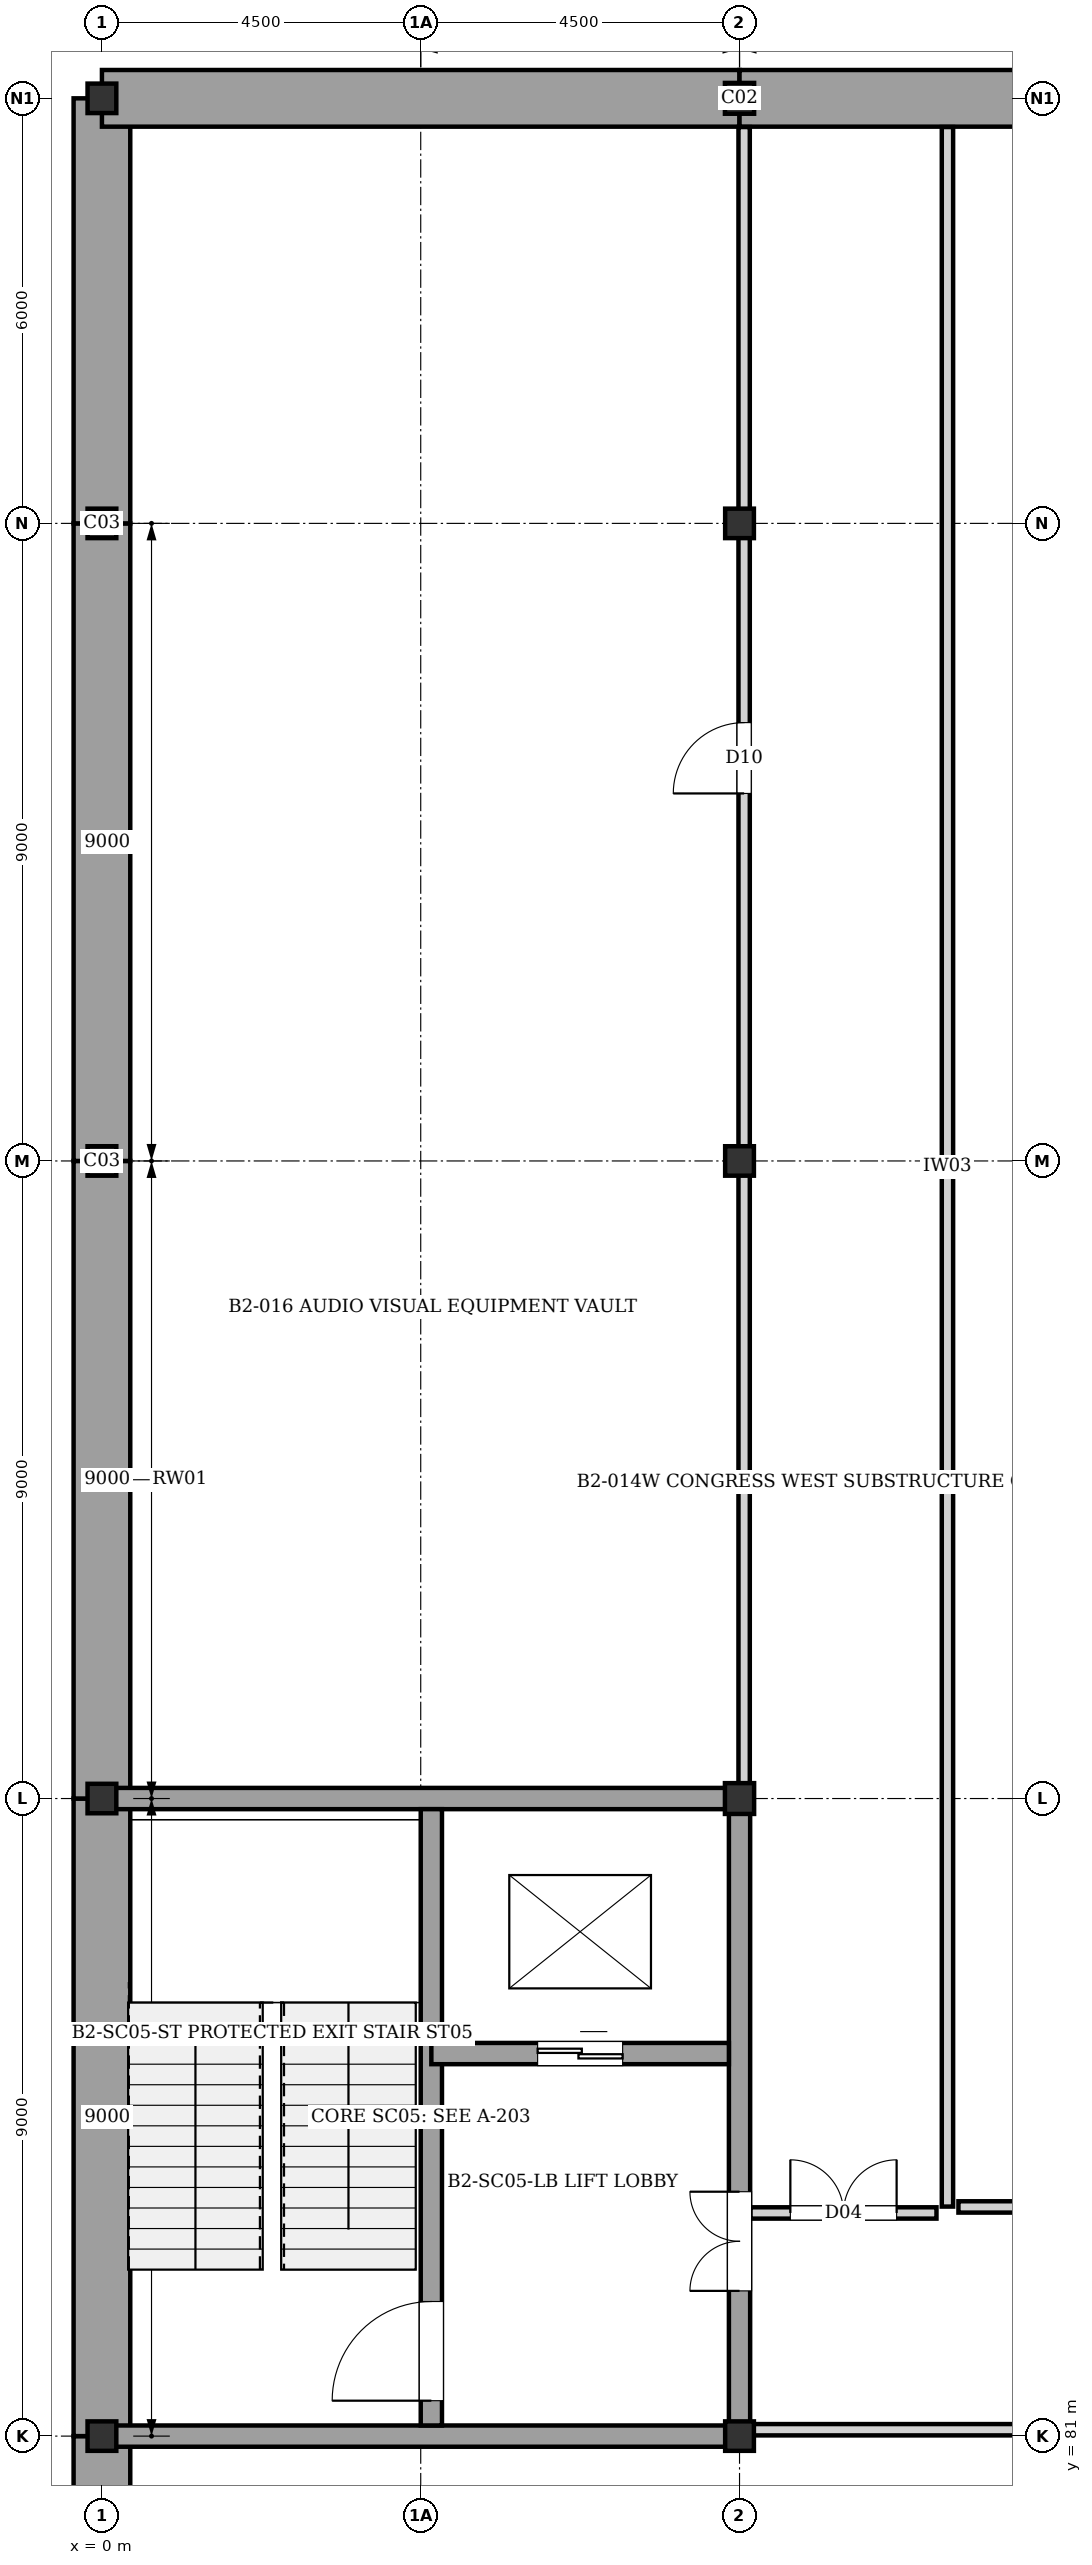
"""IFC4 building model, lengths in metres.
Left out: names, types, materials, properties, quantities, classifications, styles, units other than length and angle.
Written with IfcOpenShell. Run it as: python <this file> out.ifc"""

import sys

from ifc_helpers import new_model, si_unit, direction, frame, frame_2d, origin, origin_2d, place, context, subcontext, project, spatial, rectangle, i_section, extrude, element, fill, save


model = new_model("IFC4")
c1 = context("Model", 3, precision=1e-05, world=origin(), true_north=direction((0.0, 1.0)))
c2 = subcontext(c1, "Body", "Model", "MODEL_VIEW")
j1 = project(units=[si_unit("LENGTHUNIT", "METRE"), si_unit("PLANEANGLEUNIT", "RADIAN")], contexts=[c1])
p1 = place(None, origin())
s1 = spatial("IfcSite", under=j1, at=p1, CompositionType="ELEMENT")
p2 = place(p1, origin())
s2 = spatial("IfcBuilding", under=s1, at=p2, CompositionType="ELEMENT")
p3 = place(p2, frame((0.0, 0.0, -8.96)))
s3 = spatial("IfcBuildingStorey", under=s2, at=p3, CompositionType="ELEMENT", Elevation=-8.96)
for number, where, z_axis, x_axis in (
    (1, (0.0, 81.0, 0.0), (0.0, 0.0, 1.0), (1.0, 0.0, 0.0)),
    (2, (0.0, 90.0, 0.0), (0.0, 0.0, 1.0), (1.0, 0.0, 0.0)),
    (3, (0.0, 99.0, 0.0), (0.0, 0.0, 1.0), (1.0, 0.0, 0.0)),
    (4, (0.0, 108.0, 0.0), (0.0, 0.0, 1.0), (1.0, 0.0, 0.0)),
    (5, (0.0, 114.0, 0.0), (0.0, 0.0, 1.0), (1.0, 0.0, 0.0)),
    (6, (9.0, 81.0, 0.0), (0.0, 0.0, 1.0), (1.0, 0.0, 0.0)),
):
    element("IfcColumn", number, at=place(p3, frame(where, z_axis=z_axis, x_axis=x_axis)), inside=s3, PredefinedType="COLUMN", context=c2, shape_type="SweptSolid", body=[
        extrude(i_section(OverallWidth=0.406, OverallDepth=0.416, WebThickness=0.022, FlangeThickness=0.038, at=origin_2d()), origin(), (0.0, 0.0, 1.0), 4.48),
    ])
p4 = place(p3, frame((9.0, 90.0, 0.0), z_axis=(0.0, 0.0, 1.0), x_axis=(1.0, 0.0, 0.0)))
e7 = element("IfcColumn", 7, at=p4, inside=s3, PredefinedType="COLUMN", context=c2, shape_type="SweptSolid", body=[
    extrude(i_section(OverallWidth=0.412, OverallDepth=0.435, WebThickness=0.027, FlangeThickness=0.046, at=origin_2d()), origin(), (0.0, 0.0, 1.0), 4.48),
])
for number, where, z_axis, x_axis in (
    (8, (9.0, 99.0, 0.0), (0.0, 0.0, 1.0), (1.0, 0.0, 0.0)),
    (9, (9.0, 108.0, 0.0), (0.0, 0.0, 1.0), (1.0, 0.0, 0.0)),
):
    element("IfcColumn", number, at=place(p3, frame(where, z_axis=z_axis, x_axis=x_axis)), inside=s3, PredefinedType="COLUMN", context=c2, shape_type="SweptSolid", body=[
        extrude(i_section(OverallWidth=0.406, OverallDepth=0.416, WebThickness=0.022, FlangeThickness=0.038, at=origin_2d()), origin(), (0.0, 0.0, 1.0), 4.48),
    ])
p5 = place(p3, frame((9.0, 114.0, 0.0), z_axis=(0.0, 0.0, 1.0), x_axis=(1.0, 0.0, 0.0)))
e10 = element("IfcColumn", 10, at=p5, inside=s3, PredefinedType="COLUMN", context=c2, shape_type="SweptSolid", body=[
    extrude(i_section(OverallWidth=0.412, OverallDepth=0.435, WebThickness=0.027, FlangeThickness=0.046, at=origin_2d()), origin(), (0.0, 0.0, 1.0), 4.48),
])
p6 = place(p3, frame((0.0, 72.0, 0.0), z_axis=(0.0, 0.0, 1.0), x_axis=(0.0, 1.0, 0.0)))
e11 = element("IfcWall", 11, at=p6, inside=s3, PredefinedType="USERDEFINED", context=c2, shape_type="SweptSolid", body=[
    extrude(rectangle(XDim=9.0, YDim=0.8, at=frame_2d((4.5, 0.0))), origin(), (0.0, 0.0, 1.0), 4.03),
])
for number, where, z_axis, x_axis in (
    (12, (0.0, 81.0, 0.0), (0.0, 0.0, 1.0), (0.0, 1.0, 0.0)),
    (13, (0.0, 90.0, 0.0), (0.0, 0.0, 1.0), (0.0, 1.0, 0.0)),
    (14, (0.0, 99.0, 0.0), (0.0, 0.0, 1.0), (0.0, 1.0, 0.0)),
):
    element("IfcWall", number, at=place(p3, frame(where, z_axis=z_axis, x_axis=x_axis)), inside=s3, PredefinedType="USERDEFINED", context=c2, shape_type="SweptSolid", body=[
        extrude(rectangle(XDim=9.0, YDim=0.8, at=frame_2d((4.5, 0.0))), origin(), (0.0, 0.0, 1.0), 4.2),
    ])
p7 = place(p3, frame((0.0, 108.0, 0.0), z_axis=(0.0, 0.0, 1.0), x_axis=(0.0, 1.0, 0.0)))
e15 = element("IfcWall", 15, at=p7, inside=s3, PredefinedType="USERDEFINED", context=c2, shape_type="SweptSolid", body=[
    extrude(rectangle(XDim=6.0, YDim=0.8, at=frame_2d((3.0, 0.0))), origin(), (0.0, 0.0, 1.0), 4.2),
])
for number, where, z_axis, x_axis in (
    (16, (0.0, 114.0, 0.0), (0.0, 0.0, 1.0), (1.0, 0.0, 0.0)),
    (17, (9.0, 114.0, 0.0), (0.0, 0.0, 1.0), (1.0, 0.0, 0.0)),
):
    element("IfcWall", number, at=place(p3, frame(where, z_axis=z_axis, x_axis=x_axis)), inside=s3, PredefinedType="USERDEFINED", context=c2, shape_type="SweptSolid", body=[
        extrude(rectangle(XDim=9.0, YDim=0.8, at=frame_2d((4.5, 0.0))), origin(), (0.0, 0.0, 1.0), 4.2),
    ])
p8 = place(p3, frame((0.0, 81.0, 0.0), z_axis=(0.0, 0.0, 1.0), x_axis=(1.0, 0.0, 0.0)))
e18 = element("IfcWall", 18, at=p8, inside=s3, PredefinedType="SHEAR", context=c2, shape_type="SweptSolid", body=[
    extrude(rectangle(XDim=9.0, YDim=0.3, at=frame_2d((4.5, 0.0))), origin(), (0.0, 0.0, 1.0), 4.2),
])
p9 = place(p3, frame((9.0, 81.0, 0.0), z_axis=(0.0, 0.0, 1.0), x_axis=(0.0, 1.0, 0.0)))
e19 = element("IfcWall", 19, at=p9, inside=s3, PredefinedType="SHEAR", context=c2, shape_type="SweptSolid", body=[
    extrude(rectangle(XDim=9.0, YDim=0.3, at=frame_2d((4.5, 0.0))), origin(), (0.0, 0.0, 1.0), 4.2),
])
p10 = place(p9, frame((2.05, 0.0, 0.0)))
e20 = element("IfcOpeningElement", 20, at=p10, cuts=e19, PredefinedType="OPENING", context=c2, shape_type="SweptSolid", body=[
    extrude(rectangle(XDim=1.4, YDim=2.02, at=frame_2d((0.7, 1.01))), frame((0.0, 0.16, 0.0), z_axis=(0.0, -1.0, 0.0), x_axis=(1.0, 0.0, 0.0)), (0.0, 0.0, 1.0), 0.32),
])
p11 = place(p3, frame((0.0, 90.0, 0.0), z_axis=(0.0, 0.0, 1.0), x_axis=(1.0, 0.0, 0.0)))
e21 = element("IfcWall", 21, at=p11, inside=s3, PredefinedType="SHEAR", context=c2, shape_type="SweptSolid", body=[
    extrude(rectangle(XDim=9.0, YDim=0.3, at=frame_2d((4.5, 0.0))), origin(), (0.0, 0.0, 1.0), 4.2),
])
p12 = place(p3, frame((4.65, 81.15, 0.0), z_axis=(0.0, 0.0, 1.0), x_axis=(0.0, 1.0, 0.0)))
e22 = element("IfcWall", 22, at=p12, inside=s3, PredefinedType="SHEAR", context=c2, shape_type="SweptSolid", body=[
    extrude(rectangle(XDim=8.7, YDim=0.3, at=frame_2d((4.35, 0.0))), origin(), (0.0, 0.0, 1.0), 4.2),
])
p13 = place(p12, frame((0.35, 0.0, 0.0)))
e23 = element("IfcOpeningElement", 23, at=p13, cuts=e22, PredefinedType="OPENING", context=c2, shape_type="SweptSolid", body=[
    extrude(rectangle(XDim=1.4, YDim=2.02, at=frame_2d((0.7, 1.01))), frame((0.0, 0.16, 0.0), z_axis=(0.0, -1.0, 0.0), x_axis=(1.0, 0.0, 0.0)), (0.0, 0.0, 1.0), 0.32),
])
p14 = place(p3, frame((4.65, 86.4, 0.0), z_axis=(0.0, 0.0, 1.0), x_axis=(1.0, 0.0, 0.0)))
e24 = element("IfcWall", 24, at=p14, inside=s3, PredefinedType="SHEAR", context=c2, shape_type="SweptSolid", body=[
    extrude(rectangle(XDim=4.2, YDim=0.3, at=frame_2d((2.1, 0.0))), origin(), (0.0, 0.0, 1.0), 4.2),
])
p15 = place(p14, frame((1.5, 0.0, 0.0)))
e25 = element("IfcOpeningElement", 25, at=p15, cuts=e24, PredefinedType="OPENING", context=c2, shape_type="SweptSolid", body=[
    extrude(rectangle(XDim=1.2, YDim=2.2, at=frame_2d((0.6, 1.1))), frame((0.0, 0.16, 0.0), z_axis=(0.0, -1.0, 0.0), x_axis=(1.0, 0.0, 0.0)), (0.0, 0.0, 1.0), 0.32),
])
p16 = place(p3, frame((11.935, 84.24, 0.0), z_axis=(0.0, 0.0, 1.0), x_axis=(0.0, 1.0, 0.0)))
e26 = element("IfcWall", 26, at=p16, inside=s3, PredefinedType="PARTITIONING", context=c2, shape_type="SweptSolid", body=[
    extrude(rectangle(XDim=29.355, YDim=0.16, at=frame_2d((14.677, 0.0))), origin(), (0.0, 0.0, 1.0), 4.2),
])
p17 = place(p3, frame((9.155, 84.15, 0.0), z_axis=(0.0, 0.0, 1.0), x_axis=(1.0, 0.0, 0.0)))
e27 = element("IfcWall", 27, at=p17, inside=s3, PredefinedType="PARTITIONING", context=c2, shape_type="SweptSolid", body=[
    extrude(rectangle(XDim=2.625, YDim=0.16, at=frame_2d((1.312, 0.0))), origin(), (0.0, 0.0, 1.0), 4.2),
])
p18 = place(p17, frame((0.562, 0.0, 0.0)))
e28 = element("IfcOpeningElement", 28, at=p18, cuts=e27, PredefinedType="OPENING", context=c2, shape_type="SweptSolid", body=[
    extrude(rectangle(XDim=1.5, YDim=2.1, at=frame_2d((0.75, 1.05))), frame((0.0, 0.09, 0.0), z_axis=(0.0, -1.0, 0.0), x_axis=(1.0, 0.0, 0.0)), (0.0, 0.0, 1.0), 0.18),
])
p19 = place(p3, frame((12.09, 84.235, 0.0), z_axis=(0.0, 0.0, 1.0), x_axis=(1.0, 0.0, 0.0)))
e29 = element("IfcWall", 29, at=p19, inside=s3, PredefinedType="PARTITIONING", context=c2, shape_type="SweptSolid", body=[
    extrude(rectangle(XDim=32.755, YDim=0.16, at=frame_2d((16.377, 0.0))), origin(), (0.0, 0.0, 1.0), 4.2),
])
p20 = place(p19, frame((19.808, 0.0, 0.0)))
e30 = element("IfcOpeningElement", 30, at=p20, cuts=e29, PredefinedType="OPENING", context=c2, shape_type="SweptSolid", body=[
    extrude(rectangle(XDim=1.0, YDim=2.1, at=frame_2d((0.5, 1.05))), frame((0.0, 0.09, 0.0), z_axis=(0.0, -1.0, 0.0), x_axis=(1.0, 0.0, 0.0)), (0.0, 0.0, 1.0), 0.18),
])
p21 = place(p3, frame((9.155, 81.09, 0.0), z_axis=(0.0, 0.0, 1.0), x_axis=(1.0, 0.0, 0.0)))
e31 = element("IfcWall", 31, at=p21, inside=s3, PredefinedType="PARTITIONING", context=c2, shape_type="SweptSolid", body=[
    extrude(rectangle(XDim=35.69, YDim=0.16, at=frame_2d((17.845, 0.0))), origin(), (0.0, 0.0, 1.0), 3.3),
])
p22 = place(p21, frame((12.812, 0.0, 0.0)))
e32 = element("IfcOpeningElement", 32, at=p22, cuts=e31, PredefinedType="OPENING", context=c2, shape_type="SweptSolid", body=[
    extrude(rectangle(XDim=1.5, YDim=2.1, at=frame_2d((0.75, 1.05))), frame((0.0, 0.09, 0.0), z_axis=(0.0, -1.0, 0.0), x_axis=(1.0, 0.0, 0.0)), (0.0, 0.0, 1.0), 0.18),
])
p23 = place(p3, frame((9.065, 90.155, 0.0), z_axis=(0.0, 0.0, 1.0), x_axis=(0.0, 1.0, 0.0)))
e33 = element("IfcWall", 33, at=p23, inside=s3, PredefinedType="PARTITIONING", context=c2, shape_type="SweptSolid", body=[
    extrude(rectangle(XDim=17.865, YDim=0.16, at=frame_2d((8.933, 0.0))), origin(), (0.0, 0.0, 1.0), 3.3),
])
p24 = place(p23, frame((14.033, 0.0, 0.0)))
e34 = element("IfcOpeningElement", 34, at=p24, cuts=e33, PredefinedType="OPENING", context=c2, shape_type="SweptSolid", body=[
    extrude(rectangle(XDim=1.0, YDim=2.1, at=frame_2d((0.5, 1.05))), frame((0.0, 0.09, 0.0), z_axis=(0.0, -1.0, 0.0), x_axis=(1.0, 0.0, 0.0)), (0.0, 0.0, 1.0), 0.18),
])
p25 = place(p3, frame((9.065, 108.02, 0.0), z_axis=(0.0, 0.0, 1.0), x_axis=(0.0, 1.0, 0.0)))
e35 = element("IfcWall", 35, at=p25, inside=s3, PredefinedType="PARTITIONING", context=c2, shape_type="SweptSolid", body=[
    extrude(rectangle(XDim=5.575, YDim=0.16, at=frame_2d((2.788, 0.0))), origin(), (0.0, 0.0, 1.0), 3.5),
])
p26 = place(p10, origin())
e36 = element("IfcDoor", 36, at=p26, inside=s3, OperationType="DOUBLE_DOOR_SINGLE_SWING", PredefinedType="DOOR", context=c2, shape_type="SweptSolid", body=[
    extrude(rectangle(XDim=1.4, YDim=2.02, at=frame_2d((0.7, 1.01))), frame((0.0, 0.025, 0.0), z_axis=(0.0, -1.0, 0.0), x_axis=(1.0, 0.0, 0.0)), (0.0, 0.0, 1.0), 0.05),
])
fill(e20, e36)
p27 = place(p13, origin())
e37 = element("IfcDoor", 37, at=p27, inside=s3, OperationType="SINGLE_SWING_LEFT", PredefinedType="DOOR", context=c2, shape_type="SweptSolid", body=[
    extrude(rectangle(XDim=1.4, YDim=2.02, at=frame_2d((0.7, 1.01))), frame((0.0, 0.025, 0.0), z_axis=(0.0, -1.0, 0.0), x_axis=(1.0, 0.0, 0.0)), (0.0, 0.0, 1.0), 0.05),
])
fill(e23, e37)
p28 = place(p15, origin())
e38 = element("IfcDoor", 38, at=p28, inside=s3, OperationType="DOUBLE_DOOR_SLIDING", PredefinedType="DOOR", context=c2, shape_type="SweptSolid", body=[
    extrude(rectangle(XDim=1.2, YDim=2.2, at=frame_2d((0.6, 1.1))), frame((0.0, 0.025, 0.0), z_axis=(0.0, -1.0, 0.0), x_axis=(1.0, 0.0, 0.0)), (0.0, 0.0, 1.0), 0.05),
])
fill(e25, e38)
p29 = place(p18, origin())
e39 = element("IfcDoor", 39, at=p29, inside=s3, OperationType="DOUBLE_DOOR_SINGLE_SWING", PredefinedType="DOOR", context=c2, shape_type="SweptSolid", body=[
    extrude(rectangle(XDim=1.5, YDim=2.1, at=frame_2d((0.75, 1.05))), frame((0.0, 0.025, 0.0), z_axis=(0.0, -1.0, 0.0), x_axis=(1.0, 0.0, 0.0)), (0.0, 0.0, 1.0), 0.05),
])
fill(e28, e39)
p30 = place(p24, origin())
e40 = element("IfcDoor", 40, at=p30, inside=s3, OperationType="SINGLE_SWING_LEFT", PredefinedType="DOOR", context=c2, shape_type="SweptSolid", body=[
    extrude(rectangle(XDim=1.0, YDim=2.1, at=frame_2d((0.5, 1.05))), frame((0.0, 0.025, 0.0), z_axis=(0.0, -1.0, 0.0), x_axis=(1.0, 0.0, 0.0)), (0.0, 0.0, 1.0), 0.05),
])
fill(e34, e40)
save(model, sys.argv[1])
